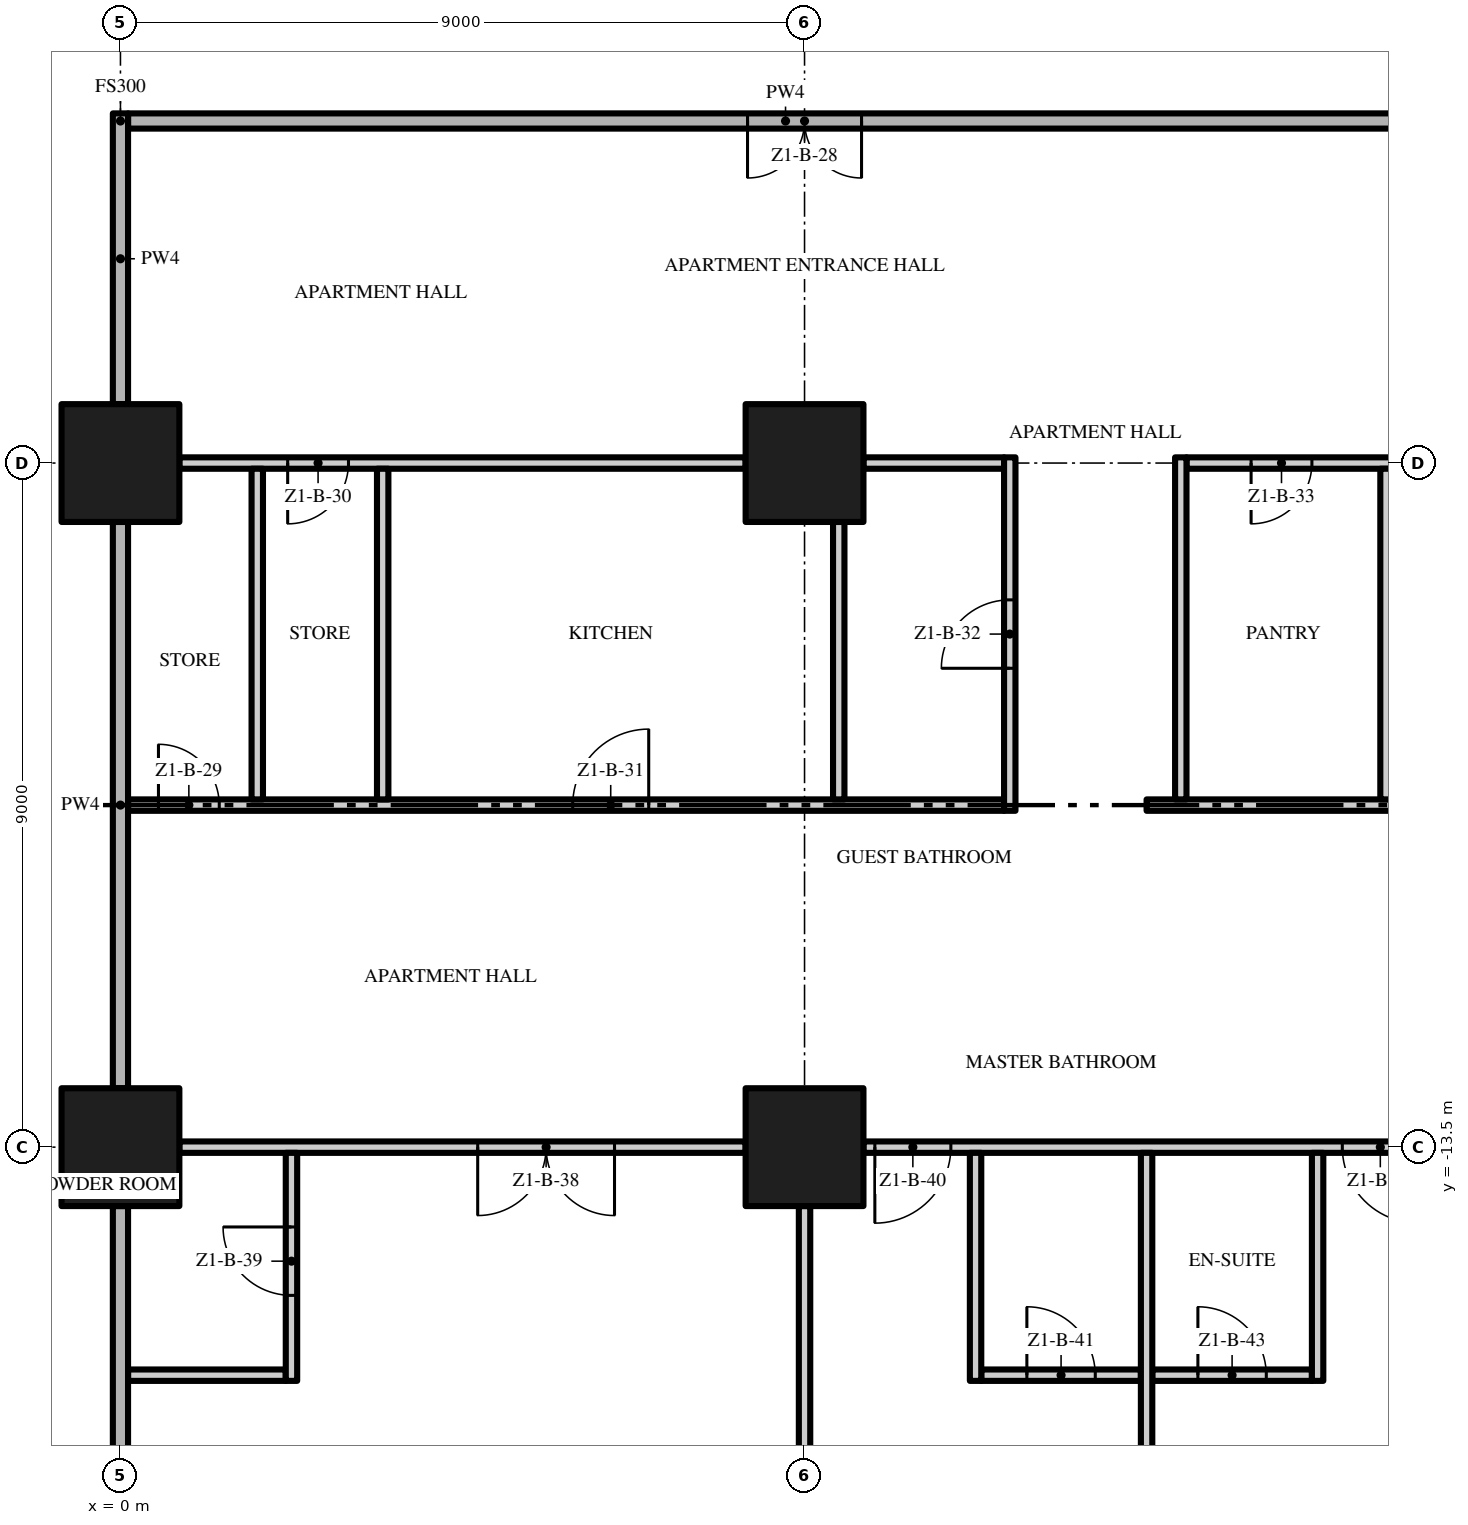
"""IFC4 building model, lengths in metres.
Left out: names, types, materials, properties, quantities, classifications, styles, units other than length and angle.
Written with IfcOpenShell. Run it as: python <this file> out.ifc"""

import sys

from ifc_helpers import new_model, si_unit, direction, frame, frame_2d, origin, origin_2d, place, context, subcontext, project, spatial, rectangle, extrude, element, fill, save


model = new_model("IFC4")
c1 = context("Model", 3, precision=1e-05, world=origin(), true_north=direction((0.0, 1.0)))
c2 = subcontext(c1, "Body", "Model", "MODEL_VIEW")
j1 = project(units=[si_unit("LENGTHUNIT", "METRE"), si_unit("PLANEANGLEUNIT", "RADIAN")], contexts=[c1])
p1 = place(None, origin())
s1 = spatial("IfcSite", under=j1, at=p1, CompositionType="ELEMENT")
p2 = place(p1, origin())
s2 = spatial("IfcBuilding", under=s1, at=p2, CompositionType="ELEMENT")
p3 = place(p2, frame((0.0, 0.0, 34.0)))
s3 = spatial("IfcBuildingStorey", under=s2, at=p3, CompositionType="ELEMENT", Elevation=34.0)
for number, where, z_axis, x_axis in (
    (1, (0.0, -13.5, 0.0), (0.0, 0.0, 1.0), (1.0, 0.0, 0.0)),
    (2, (0.0, -4.5, 0.0), (0.0, 0.0, 1.0), (1.0, 0.0, 0.0)),
    (3, (9.0, -13.5, 0.0), (0.0, 0.0, 1.0), (1.0, 0.0, 0.0)),
    (4, (9.0, -4.5, 0.0), (0.0, 0.0, 1.0), (1.0, 0.0, 0.0)),
):
    element("IfcColumn", number, at=place(p3, frame(where, z_axis=z_axis, x_axis=x_axis)), inside=s3, PredefinedType="COLUMN", context=c2, shape_type="SweptSolid", body=[
        extrude(rectangle(XDim=1.55, YDim=1.55, at=origin_2d()), origin(), (0.0, 0.0, 1.0), 3.5),
    ])
p4 = place(p3, frame((0.1, -16.5, 0.0), z_axis=(0.0, 0.0, 1.0), x_axis=(1.0, 0.0, 0.0)))
e5 = element("IfcWall", 5, at=p4, inside=s3, PredefinedType="PARTITIONING", context=c2, shape_type="SweptSolid", body=[
    extrude(rectangle(XDim=2.075, YDim=0.15, at=frame_2d((1.038, 0.0))), origin(), (0.0, 0.0, 1.0), 3.5),
])
p5 = place(p3, frame((11.325, -16.5, 0.0), z_axis=(0.0, 0.0, 1.0), x_axis=(1.0, 0.0, 0.0)))
e6 = element("IfcWall", 6, at=p5, inside=s3, PredefinedType="PARTITIONING", context=c2, shape_type="SweptSolid", body=[
    extrude(rectangle(XDim=2.1, YDim=0.15, at=frame_2d((1.05, 0.0))), origin(), (0.0, 0.0, 1.0), 3.5),
])
p6 = place(p5, frame((0.6, 0.0, 0.0)))
e7 = element("IfcOpeningElement", 7, at=p6, cuts=e6, PredefinedType="OPENING", context=c2, shape_type="SweptSolid", body=[
    extrude(rectangle(XDim=0.9, YDim=2.1, at=frame_2d((0.45, 1.05))), frame((0.0, 0.085, 0.0), z_axis=(0.0, -1.0, 0.0), x_axis=(1.0, 0.0, 0.0)), (0.0, 0.0, 1.0), 0.17),
])
p7 = place(p3, frame((13.575, -16.5, 0.0), z_axis=(0.0, 0.0, 1.0), x_axis=(1.0, 0.0, 0.0)))
e8 = element("IfcWall", 8, at=p7, inside=s3, PredefinedType="PARTITIONING", context=c2, shape_type="SweptSolid", body=[
    extrude(rectangle(XDim=2.1, YDim=0.15, at=frame_2d((1.05, 0.0))), origin(), (0.0, 0.0, 1.0), 3.5),
])
p8 = place(p7, frame((0.6, 0.0, 0.0)))
e9 = element("IfcOpeningElement", 9, at=p8, cuts=e8, PredefinedType="OPENING", context=c2, shape_type="SweptSolid", body=[
    extrude(rectangle(XDim=0.9, YDim=2.1, at=frame_2d((0.45, 1.05))), frame((0.0, 0.085, 0.0), z_axis=(0.0, -1.0, 0.0), x_axis=(1.0, 0.0, 0.0)), (0.0, 0.0, 1.0), 0.17),
])
p9 = place(p3, frame((8.225, -13.5, 0.0), z_axis=(0.0, 0.0, 1.0), x_axis=(-1.0, 0.0, 0.0)))
e10 = element("IfcWall", 10, at=p9, inside=s3, PredefinedType="PARTITIONING", context=c2, shape_type="SweptSolid", body=[
    extrude(rectangle(XDim=7.45, YDim=0.15, at=frame_2d((3.725, 0.0))), origin(), (0.0, 0.0, 1.0), 3.5),
])
p10 = place(p9, frame((1.725, 0.0, 0.0)))
e11 = element("IfcOpeningElement", 11, at=p10, cuts=e10, PredefinedType="OPENING", context=c2, shape_type="SweptSolid", body=[
    extrude(rectangle(XDim=1.8, YDim=2.4, at=frame_2d((0.9, 1.2))), frame((0.0, 0.085, 0.0), z_axis=(0.0, -1.0, 0.0), x_axis=(1.0, 0.0, 0.0)), (0.0, 0.0, 1.0), 0.17),
])
p11 = place(p3, frame((17.225, -13.5, 0.0), z_axis=(0.0, 0.0, 1.0), x_axis=(-1.0, 0.0, 0.0)))
e12 = element("IfcWall", 12, at=p11, inside=s3, PredefinedType="PARTITIONING", context=c2, shape_type="SweptSolid", body=[
    extrude(rectangle(XDim=7.45, YDim=0.15, at=frame_2d((3.725, 0.0))), origin(), (0.0, 0.0, 1.0), 3.5),
])
p12 = place(p11, frame((6.3, 0.0, 0.0)))
e13 = element("IfcOpeningElement", 13, at=p12, cuts=e12, PredefinedType="OPENING", context=c2, shape_type="SweptSolid", body=[
    extrude(rectangle(XDim=1.0, YDim=2.4, at=frame_2d((0.5, 1.2))), frame((0.0, 0.085, 0.0), z_axis=(0.0, -1.0, 0.0), x_axis=(1.0, 0.0, 0.0)), (0.0, 0.0, 1.0), 0.17),
])
p13 = place(p11, frame((0.15, 0.0, 0.0)))
e14 = element("IfcOpeningElement", 14, at=p13, cuts=e12, PredefinedType="OPENING", context=c2, shape_type="SweptSolid", body=[
    extrude(rectangle(XDim=1.0, YDim=2.4, at=frame_2d((0.5, 1.2))), frame((0.0, 0.085, 0.0), z_axis=(0.0, -1.0, 0.0), x_axis=(1.0, 0.0, 0.0)), (0.0, 0.0, 1.0), 0.17),
])
p14 = place(p3, frame((0.1, -9.0, 0.0), z_axis=(0.0, 0.0, 1.0), x_axis=(1.0, 0.0, 0.0)))
e15 = element("IfcWall", 15, at=p14, inside=s3, PredefinedType="PARTITIONING", context=c2, shape_type="SweptSolid", body=[
    extrude(rectangle(XDim=11.525, YDim=0.15, at=frame_2d((5.763, 0.0))), origin(), (0.0, 0.0, 1.0), 3.5),
])
p15 = place(p14, frame((0.4, 0.0, 0.0)))
e16 = element("IfcOpeningElement", 16, at=p15, cuts=e15, PredefinedType="OPENING", context=c2, shape_type="SweptSolid", body=[
    extrude(rectangle(XDim=0.8, YDim=2.0, at=frame_2d((0.4, 1.0))), frame((0.0, 0.085, 0.0), z_axis=(0.0, -1.0, 0.0), x_axis=(1.0, 0.0, 0.0)), (0.0, 0.0, 1.0), 0.17),
])
p16 = place(p14, frame((5.85, 0.0, 0.0)))
e17 = element("IfcOpeningElement", 17, at=p16, cuts=e15, PredefinedType="OPENING", context=c2, shape_type="SweptSolid", body=[
    extrude(rectangle(XDim=1.0, YDim=2.4, at=frame_2d((0.5, 1.2))), frame((0.0, 0.085, 0.0), z_axis=(0.0, -1.0, 0.0), x_axis=(1.0, 0.0, 0.0)), (0.0, 0.0, 1.0), 0.17),
])
p17 = place(p3, frame((13.5, -9.0, 0.0), z_axis=(0.0, 0.0, 1.0), x_axis=(1.0, 0.0, 0.0)))
e18 = element("IfcWall", 18, at=p17, inside=s3, PredefinedType="PARTITIONING", context=c2, shape_type="SweptSolid", body=[
    extrude(rectangle(XDim=13.2, YDim=0.15, at=frame_2d((6.6, 0.0))), origin(), (0.0, 0.0, 1.0), 3.5),
])
p18 = place(p17, frame((4.0, 0.0, 0.0)))
e19 = element("IfcOpeningElement", 19, at=p18, cuts=e18, PredefinedType="OPENING", context=c2, shape_type="SweptSolid", body=[
    extrude(rectangle(XDim=0.8, YDim=2.0, at=frame_2d((0.4, 1.0))), frame((0.0, 0.085, 0.0), z_axis=(0.0, -1.0, 0.0), x_axis=(1.0, 0.0, 0.0)), (0.0, 0.0, 1.0), 0.17),
])
p19 = place(p17, frame((12.2, 0.0, 0.0)))
e20 = element("IfcOpeningElement", 20, at=p19, cuts=e18, PredefinedType="OPENING", context=c2, shape_type="SweptSolid", body=[
    extrude(rectangle(XDim=0.8, YDim=2.0, at=frame_2d((0.4, 1.0))), frame((0.0, 0.085, 0.0), z_axis=(0.0, -1.0, 0.0), x_axis=(1.0, 0.0, 0.0)), (0.0, 0.0, 1.0), 0.17),
])
p20 = place(p3, frame((8.225, -4.5, 0.0), z_axis=(0.0, 0.0, 1.0), x_axis=(-1.0, 0.0, 0.0)))
e21 = element("IfcWall", 21, at=p20, inside=s3, PredefinedType="PARTITIONING", context=c2, shape_type="SweptSolid", body=[
    extrude(rectangle(XDim=7.45, YDim=0.15, at=frame_2d((3.725, 0.0))), origin(), (0.0, 0.0, 1.0), 3.5),
])
p21 = place(p20, frame((5.225, 0.0, 0.0)))
e22 = element("IfcOpeningElement", 22, at=p21, cuts=e21, PredefinedType="OPENING", context=c2, shape_type="SweptSolid", body=[
    extrude(rectangle(XDim=0.8, YDim=2.0, at=frame_2d((0.4, 1.0))), frame((0.0, 0.085, 0.0), z_axis=(0.0, -1.0, 0.0), x_axis=(1.0, 0.0, 0.0)), (0.0, 0.0, 1.0), 0.17),
])
p22 = place(p3, frame((9.775, -4.5, 0.0), z_axis=(0.0, 0.0, 1.0), x_axis=(1.0, 0.0, 0.0)))
e23 = element("IfcWall", 23, at=p22, inside=s3, PredefinedType="PARTITIONING", context=c2, shape_type="SweptSolid", body=[
    extrude(rectangle(XDim=1.85, YDim=0.15, at=frame_2d((0.925, 0.0))), origin(), (0.0, 0.0, 1.0), 3.5),
])
p23 = place(p3, frame((17.225, -4.5, 0.0), z_axis=(0.0, 0.0, 1.0), x_axis=(-1.0, 0.0, 0.0)))
e24 = element("IfcWall", 24, at=p23, inside=s3, PredefinedType="PARTITIONING", context=c2, shape_type="SweptSolid", body=[
    extrude(rectangle(XDim=3.2, YDim=0.15, at=frame_2d((1.6, 0.0))), origin(), (0.0, 0.0, 1.0), 3.5),
])
p24 = place(p23, frame((1.55, 0.0, 0.0)))
e25 = element("IfcOpeningElement", 25, at=p24, cuts=e24, PredefinedType="OPENING", context=c2, shape_type="SweptSolid", body=[
    extrude(rectangle(XDim=0.8, YDim=2.0, at=frame_2d((0.4, 1.0))), frame((0.0, 0.085, 0.0), z_axis=(0.0, -1.0, 0.0), x_axis=(1.0, 0.0, 0.0)), (0.0, 0.0, 1.0), 0.17),
])
p25 = place(p3, frame((17.4, 0.0, 0.0), z_axis=(0.0, 0.0, 1.0), x_axis=(-1.0, 0.0, 0.0)))
e26 = element("IfcWall", 26, at=p25, inside=s3, PredefinedType="PARTITIONING", context=c2, shape_type="SweptSolid", body=[
    extrude(rectangle(XDim=17.3, YDim=0.2, at=frame_2d((8.65, 0.0))), origin(), (0.0, 0.0, 1.0), 3.5),
])
p26 = place(p25, frame((7.65, 0.0, 0.0)))
e27 = element("IfcOpeningElement", 27, at=p26, cuts=e26, PredefinedType="OPENING", context=c2, shape_type="SweptSolid", body=[
    extrude(rectangle(XDim=1.5, YDim=2.4, at=frame_2d((0.75, 1.2))), frame((0.0, 0.11, 0.0), z_axis=(0.0, -1.0, 0.0), x_axis=(1.0, 0.0, 0.0)), (0.0, 0.0, 1.0), 0.22),
])
p27 = place(p3, frame((0.0, -21.05, 0.0), z_axis=(0.0, 0.0, 1.0), x_axis=(0.0, 1.0, 0.0)))
e28 = element("IfcWall", 28, at=p27, inside=s3, PredefinedType="PARTITIONING", context=c2, shape_type="SweptSolid", body=[
    extrude(rectangle(XDim=6.775, YDim=0.2, at=frame_2d((3.388, 0.0))), origin(), (0.0, 0.0, 1.0), 3.5),
])
p28 = place(p3, frame((0.0, -12.725, 0.0), z_axis=(0.0, 0.0, 1.0), x_axis=(0.0, 1.0, 0.0)))
e29 = element("IfcWall", 29, at=p28, inside=s3, PredefinedType="PARTITIONING", context=c2, shape_type="SweptSolid", body=[
    extrude(rectangle(XDim=7.45, YDim=0.2, at=frame_2d((3.725, 0.0))), origin(), (0.0, 0.0, 1.0), 3.5),
])
p29 = place(p3, frame((0.0, -3.725, 0.0), z_axis=(0.0, 0.0, 1.0), x_axis=(0.0, 1.0, 0.0)))
e30 = element("IfcWall", 30, at=p29, inside=s3, PredefinedType="PARTITIONING", context=c2, shape_type="SweptSolid", body=[
    extrude(rectangle(XDim=3.825, YDim=0.2, at=frame_2d((1.913, 0.0))), origin(), (0.0, 0.0, 1.0), 3.5),
])
p30 = place(p3, frame((1.8, -8.925, 0.0), z_axis=(0.0, 0.0, 1.0), x_axis=(0.0, 1.0, 0.0)))
e31 = element("IfcWall", 31, at=p30, inside=s3, PredefinedType="PARTITIONING", context=c2, shape_type="SweptSolid", body=[
    extrude(rectangle(XDim=4.35, YDim=0.15, at=frame_2d((2.175, 0.0))), origin(), (0.0, 0.0, 1.0), 3.5),
])
p31 = place(p3, frame((2.25, -16.575, 0.0), z_axis=(0.0, 0.0, 1.0), x_axis=(0.0, 1.0, 0.0)))
e32 = element("IfcWall", 32, at=p31, inside=s3, PredefinedType="PARTITIONING", context=c2, shape_type="SweptSolid", body=[
    extrude(rectangle(XDim=3.0, YDim=0.15, at=frame_2d((1.5, 0.0))), origin(), (0.0, 0.0, 1.0), 3.5),
])
p32 = place(p31, frame((1.125, 0.0, 0.0)))
e33 = element("IfcOpeningElement", 33, at=p32, cuts=e32, PredefinedType="OPENING", context=c2, shape_type="SweptSolid", body=[
    extrude(rectangle(XDim=0.9, YDim=2.1, at=frame_2d((0.45, 1.05))), frame((0.0, 0.085, 0.0), z_axis=(0.0, -1.0, 0.0), x_axis=(1.0, 0.0, 0.0)), (0.0, 0.0, 1.0), 0.17),
])
p33 = place(p3, frame((3.45, -8.925, 0.0), z_axis=(0.0, 0.0, 1.0), x_axis=(0.0, 1.0, 0.0)))
e34 = element("IfcWall", 34, at=p33, inside=s3, PredefinedType="PARTITIONING", context=c2, shape_type="SweptSolid", body=[
    extrude(rectangle(XDim=4.35, YDim=0.15, at=frame_2d((2.175, 0.0))), origin(), (0.0, 0.0, 1.0), 3.5),
])
p34 = place(p3, frame((9.0, -21.05, 0.0), z_axis=(0.0, 0.0, 1.0), x_axis=(0.0, 1.0, 0.0)))
e35 = element("IfcWall", 35, at=p34, inside=s3, PredefinedType="PARTITIONING", context=c2, shape_type="SweptSolid", body=[
    extrude(rectangle(XDim=6.775, YDim=0.15, at=frame_2d((3.388, 0.0))), origin(), (0.0, 0.0, 1.0), 3.5),
])
p35 = place(p3, frame((9.45, -8.925, 0.0), z_axis=(0.0, 0.0, 1.0), x_axis=(0.0, 1.0, 0.0)))
e36 = element("IfcWall", 36, at=p35, inside=s3, PredefinedType="PARTITIONING", context=c2, shape_type="SweptSolid", body=[
    extrude(rectangle(XDim=3.65, YDim=0.15, at=frame_2d((1.825, 0.0))), origin(), (0.0, 0.0, 1.0), 3.5),
])
p36 = place(p3, frame((11.25, -16.575, 0.0), z_axis=(0.0, 0.0, 1.0), x_axis=(0.0, 1.0, 0.0)))
e37 = element("IfcWall", 37, at=p36, inside=s3, PredefinedType="PARTITIONING", context=c2, shape_type="SweptSolid", body=[
    extrude(rectangle(XDim=3.0, YDim=0.15, at=frame_2d((1.5, 0.0))), origin(), (0.0, 0.0, 1.0), 3.5),
])
p37 = place(p3, frame((11.7, -9.075, 0.0), z_axis=(0.0, 0.0, 1.0), x_axis=(0.0, 1.0, 0.0)))
e38 = element("IfcWall", 38, at=p37, inside=s3, PredefinedType="PARTITIONING", context=c2, shape_type="SweptSolid", body=[
    extrude(rectangle(XDim=4.65, YDim=0.15, at=frame_2d((2.325, 0.0))), origin(), (0.0, 0.0, 1.0), 3.5),
])
p38 = place(p37, frame((1.875, 0.0, 0.0)))
e39 = element("IfcOpeningElement", 39, at=p38, cuts=e38, PredefinedType="OPENING", context=c2, shape_type="SweptSolid", body=[
    extrude(rectangle(XDim=0.9, YDim=2.1, at=frame_2d((0.45, 1.05))), frame((0.0, 0.085, 0.0), z_axis=(0.0, -1.0, 0.0), x_axis=(1.0, 0.0, 0.0)), (0.0, 0.0, 1.0), 0.17),
])
p39 = place(p3, frame((13.5, -22.2, 0.0), z_axis=(0.0, 0.0, 1.0), x_axis=(0.0, 1.0, 0.0)))
e40 = element("IfcWall", 40, at=p39, inside=s3, PredefinedType="PARTITIONING", context=c2, shape_type="SweptSolid", body=[
    extrude(rectangle(XDim=8.625, YDim=0.15, at=frame_2d((4.312, 0.0))), origin(), (0.0, 0.0, 1.0), 3.5),
])
p40 = place(p3, frame((13.95, -8.925, 0.0), z_axis=(0.0, 0.0, 1.0), x_axis=(0.0, 1.0, 0.0)))
e41 = element("IfcWall", 41, at=p40, inside=s3, PredefinedType="PARTITIONING", context=c2, shape_type="SweptSolid", body=[
    extrude(rectangle(XDim=4.5, YDim=0.15, at=frame_2d((2.25, 0.0))), origin(), (0.0, 0.0, 1.0), 3.5),
])
p41 = place(p3, frame((15.75, -16.575, 0.0), z_axis=(0.0, 0.0, 1.0), x_axis=(0.0, 1.0, 0.0)))
e42 = element("IfcWall", 42, at=p41, inside=s3, PredefinedType="PARTITIONING", context=c2, shape_type="SweptSolid", body=[
    extrude(rectangle(XDim=3.0, YDim=0.15, at=frame_2d((1.5, 0.0))), origin(), (0.0, 0.0, 1.0), 3.5),
])
p42 = place(p3, frame((16.65, -8.925, 0.0), z_axis=(0.0, 0.0, 1.0), x_axis=(0.0, 1.0, 0.0)))
e43 = element("IfcWall", 43, at=p42, inside=s3, PredefinedType="PARTITIONING", context=c2, shape_type="SweptSolid", body=[
    extrude(rectangle(XDim=4.35, YDim=0.15, at=frame_2d((2.175, 0.0))), origin(), (0.0, 0.0, 1.0), 3.5),
])
p43 = place(p26, origin())
e44 = element("IfcDoor", 44, at=p43, inside=s3, OperationType="DOUBLE_DOOR_SINGLE_SWING", PredefinedType="DOOR", context=c2, shape_type="SweptSolid", body=[
    extrude(rectangle(XDim=1.5, YDim=2.4, at=frame_2d((0.75, 1.2))), frame((0.0, 0.025, 0.0), z_axis=(0.0, -1.0, 0.0), x_axis=(1.0, 0.0, 0.0)), (0.0, 0.0, 1.0), 0.05),
])
fill(e27, e44)
p44 = place(p15, origin())
e45 = element("IfcDoor", 45, at=p44, inside=s3, OperationType="SINGLE_SWING_LEFT", PredefinedType="DOOR", context=c2, shape_type="SweptSolid", body=[
    extrude(rectangle(XDim=0.8, YDim=2.0, at=frame_2d((0.4, 1.0))), frame((0.0, 0.025, 0.0), z_axis=(0.0, -1.0, 0.0), x_axis=(1.0, 0.0, 0.0)), (0.0, 0.0, 1.0), 0.05),
])
fill(e16, e45)
p45 = place(p21, origin())
e46 = element("IfcDoor", 46, at=p45, inside=s3, OperationType="SINGLE_SWING_RIGHT", PredefinedType="DOOR", context=c2, shape_type="SweptSolid", body=[
    extrude(rectangle(XDim=0.8, YDim=2.0, at=frame_2d((0.4, 1.0))), frame((0.0, 0.025, 0.0), z_axis=(0.0, -1.0, 0.0), x_axis=(1.0, 0.0, 0.0)), (0.0, 0.0, 1.0), 0.05),
])
fill(e22, e46)
p46 = place(p16, origin())
e47 = element("IfcDoor", 47, at=p46, inside=s3, OperationType="SINGLE_SWING_RIGHT", PredefinedType="DOOR", context=c2, shape_type="SweptSolid", body=[
    extrude(rectangle(XDim=1.0, YDim=2.4, at=frame_2d((0.5, 1.2))), frame((0.0, 0.025, 0.0), z_axis=(0.0, -1.0, 0.0), x_axis=(1.0, 0.0, 0.0)), (0.0, 0.0, 1.0), 0.05),
])
fill(e17, e47)
p47 = place(p38, origin())
e48 = element("IfcDoor", 48, at=p47, inside=s3, OperationType="SINGLE_SWING_LEFT", PredefinedType="DOOR", context=c2, shape_type="SweptSolid", body=[
    extrude(rectangle(XDim=0.9, YDim=2.1, at=frame_2d((0.45, 1.05))), frame((0.0, 0.025, 0.0), z_axis=(0.0, -1.0, 0.0), x_axis=(1.0, 0.0, 0.0)), (0.0, 0.0, 1.0), 0.05),
])
fill(e39, e48)
p48 = place(p24, origin())
e49 = element("IfcDoor", 49, at=p48, inside=s3, OperationType="SINGLE_SWING_RIGHT", PredefinedType="DOOR", context=c2, shape_type="SweptSolid", body=[
    extrude(rectangle(XDim=0.8, YDim=2.0, at=frame_2d((0.4, 1.0))), frame((0.0, 0.025, 0.0), z_axis=(0.0, -1.0, 0.0), x_axis=(1.0, 0.0, 0.0)), (0.0, 0.0, 1.0), 0.05),
])
fill(e25, e49)
p49 = place(p10, origin())
e50 = element("IfcDoor", 50, at=p49, inside=s3, OperationType="DOUBLE_DOOR_SINGLE_SWING", PredefinedType="DOOR", context=c2, shape_type="SweptSolid", body=[
    extrude(rectangle(XDim=1.8, YDim=2.4, at=frame_2d((0.9, 1.2))), frame((0.0, 0.025, 0.0), z_axis=(0.0, -1.0, 0.0), x_axis=(1.0, 0.0, 0.0)), (0.0, 0.0, 1.0), 0.05),
])
fill(e11, e50)
p50 = place(p32, origin())
e51 = element("IfcDoor", 51, at=p50, inside=s3, OperationType="SINGLE_SWING_RIGHT", PredefinedType="DOOR", context=c2, shape_type="SweptSolid", body=[
    extrude(rectangle(XDim=0.9, YDim=2.1, at=frame_2d((0.45, 1.05))), frame((0.0, 0.025, 0.0), z_axis=(0.0, -1.0, 0.0), x_axis=(1.0, 0.0, 0.0)), (0.0, 0.0, 1.0), 0.05),
])
fill(e33, e51)
p51 = place(p12, origin())
e52 = element("IfcDoor", 52, at=p51, inside=s3, OperationType="SINGLE_SWING_RIGHT", PredefinedType="DOOR", context=c2, shape_type="SweptSolid", body=[
    extrude(rectangle(XDim=1.0, YDim=2.4, at=frame_2d((0.5, 1.2))), frame((0.0, 0.025, 0.0), z_axis=(0.0, -1.0, 0.0), x_axis=(1.0, 0.0, 0.0)), (0.0, 0.0, 1.0), 0.05),
])
fill(e13, e52)
p52 = place(p6, origin())
e53 = element("IfcDoor", 53, at=p52, inside=s3, OperationType="SINGLE_SWING_LEFT", PredefinedType="DOOR", context=c2, shape_type="SweptSolid", body=[
    extrude(rectangle(XDim=0.9, YDim=2.1, at=frame_2d((0.45, 1.05))), frame((0.0, 0.025, 0.0), z_axis=(0.0, -1.0, 0.0), x_axis=(1.0, 0.0, 0.0)), (0.0, 0.0, 1.0), 0.05),
])
fill(e7, e53)
p53 = place(p13, origin())
e54 = element("IfcDoor", 54, at=p53, inside=s3, OperationType="SINGLE_SWING_LEFT", PredefinedType="DOOR", context=c2, shape_type="SweptSolid", body=[
    extrude(rectangle(XDim=1.0, YDim=2.4, at=frame_2d((0.5, 1.2))), frame((0.0, 0.025, 0.0), z_axis=(0.0, -1.0, 0.0), x_axis=(1.0, 0.0, 0.0)), (0.0, 0.0, 1.0), 0.05),
])
fill(e14, e54)
p54 = place(p8, origin())
e55 = element("IfcDoor", 55, at=p54, inside=s3, OperationType="SINGLE_SWING_LEFT", PredefinedType="DOOR", context=c2, shape_type="SweptSolid", body=[
    extrude(rectangle(XDim=0.9, YDim=2.1, at=frame_2d((0.45, 1.05))), frame((0.0, 0.025, 0.0), z_axis=(0.0, -1.0, 0.0), x_axis=(1.0, 0.0, 0.0)), (0.0, 0.0, 1.0), 0.05),
])
fill(e9, e55)
save(model, sys.argv[1])
